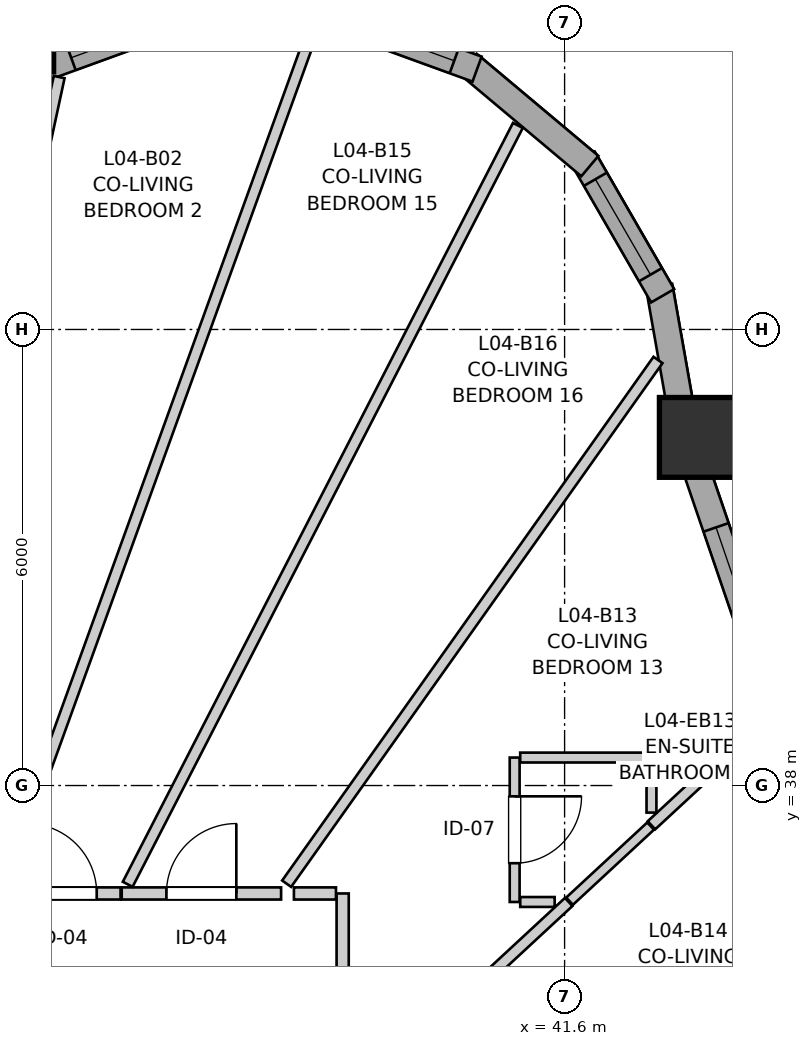
"""IFC4 building model, lengths in metres.
Left out: names, types, materials, properties, quantities, classifications, styles, units other than length and angle.
Written with IfcOpenShell. Run it as: python <this file> out.ifc"""

import sys

from ifc_helpers import new_model, si_unit, direction, frame, frame_2d, origin, origin_2d, place, context, subcontext, project, spatial, rectangle, i_section, extrude, source, transform, mapped, element, fill, save


model = new_model("IFC4")
c1 = context("Model", 3, precision=1e-05, world=origin(), true_north=direction((0.0, 1.0)))
c2 = subcontext(c1, "Body", "Model", "MODEL_VIEW")
j1 = project(units=[si_unit("LENGTHUNIT", "METRE"), si_unit("PLANEANGLEUNIT", "RADIAN")], contexts=[c1])
p1 = place(None, origin())
s1 = spatial("IfcSite", under=j1, at=p1, CompositionType="ELEMENT")
p2 = place(p1, origin())
s2 = spatial("IfcBuilding", under=s1, at=p2, CompositionType="ELEMENT")
p3 = place(p2, frame((0.0, 0.0, 17.4)))
s3 = spatial("IfcBuildingStorey", under=s2, at=p3, CompositionType="ELEMENT", Elevation=17.4)
m1 = source(origin(), c2, "Body", "SweptSolid", [
    extrude(rectangle(XDim=1.05, YDim=1.05, at=origin_2d()), origin(), (0.0, 0.0, 1.0), 2.94),
])
p4 = place(p3, frame((43.373, 42.58, 0.0), z_axis=(0.0, 0.0, 1.0), x_axis=(1.0, 0.0, 0.0)))
e1 = element("IfcColumn", 1, at=p4, inside=s3, PredefinedType="COLUMN", context=c2, shape_type="MappedRepresentation", body=[
    mapped(m1, transform((0.0, 0.0, 0.0), x_axis=(1.0, 0.0, 0.0), y_axis=(0.0, 1.0, 0.0), z_axis=(0.0, 0.0, 1.0), scale=1.0)),
])
m2 = source(origin(), c2, "Body", "SweptSolid", [
    extrude(i_section(OverallWidth=0.409, OverallDepth=0.425, WebThickness=0.03, FlangeThickness=0.048, FilletRadius=0.015, at=origin_2d()), origin(), (0.0, 0.0, 1.0), 2.94),
])
p5 = place(p3, frame((34.673, 47.603, 0.0), z_axis=(0.0, 0.0, 1.0), x_axis=(1.0, 0.0, 0.0)))
e2 = element("IfcColumn", 2, at=p5, inside=s3, PredefinedType="PILASTER", context=c2, shape_type="MappedRepresentation", body=[
    mapped(m2, transform((0.0, 0.0, 0.0), x_axis=(1.0, 0.0, 0.0), y_axis=(0.0, 1.0, 0.0), z_axis=(0.0, 0.0, 1.0), scale=1.0)),
])
p6 = place(p3, frame((44.353, 39.171, 0.0), z_axis=(0.0, 0.0, 1.0), x_axis=(-0.323604310653, 0.946192501623, 0.0)))
e3 = element("IfcWall", 3, at=p6, inside=s3, PredefinedType="SOLIDWALL", context=c2, shape_type="SweptSolid", body=[
    extrude(rectangle(XDim=3.243, YDim=0.35, at=frame_2d((1.621, 0.0))), origin(), (0.0, 0.0, 1.0), 2.42),
])
p7 = place(p6, frame((0.901, 0.0, 0.82)))
e4 = element("IfcOpeningElement", 4, at=p7, cuts=e3, PredefinedType="OPENING", context=c2, shape_type="SweptSolid", body=[
    extrude(rectangle(XDim=1.45, YDim=1.25, at=frame_2d((0.725, 0.625))), frame((0.0, 0.185, 0.0), z_axis=(0.0, -1.0, 0.0), x_axis=(1.0, 0.0, 0.0)), (0.0, 0.0, 1.0), 0.37),
])
p8 = place(p3, frame((43.148, 42.845, 0.0), z_axis=(0.0, 0.0, 1.0), x_axis=(-0.173745591742, 0.984790571315, 0.0)))
e5 = element("IfcWall", 5, at=p8, inside=s3, PredefinedType="SOLIDWALL", context=c2, shape_type="SweptSolid", body=[
    extrude(rectangle(XDim=1.752, YDim=0.35, at=frame_2d((0.876, 0.0))), origin(), (0.0, 0.0, 1.0), 2.42),
])
p9 = place(p3, frame((42.89, 44.443, 0.0), z_axis=(0.0, 0.0, 1.0), x_axis=(-0.499995423472, 0.866028046028, 0.0)))
e6 = element("IfcWall", 6, at=p9, inside=s3, PredefinedType="SOLIDWALL", context=c2, shape_type="SweptSolid", body=[
    extrude(rectangle(XDim=2.09, YDim=0.35, at=frame_2d((1.045, 0.0))), origin(), (0.0, 0.0, 1.0), 2.42),
])
p10 = place(p9, frame((0.32, 0.0, 0.82)))
e7 = element("IfcOpeningElement", 7, at=p10, cuts=e6, PredefinedType="OPENING", context=c2, shape_type="SweptSolid", body=[
    extrude(rectangle(XDim=1.45, YDim=1.25, at=frame_2d((0.725, 0.625))), frame((0.0, 0.185, 0.0), z_axis=(0.0, -1.0, 0.0), x_axis=(1.0, 0.0, 0.0)), (0.0, 0.0, 1.0), 0.37),
])
p11 = place(p3, frame((41.932, 46.15, 0.0), z_axis=(0.0, 0.0, 1.0), x_axis=(-0.766024572719, 0.642811289563, 0.0)))
e8 = element("IfcWall", 8, at=p11, inside=s3, PredefinedType="SOLIDWALL", context=c2, shape_type="SweptSolid", body=[
    extrude(rectangle(XDim=2.09, YDim=0.35, at=frame_2d((1.045, 0.0))), origin(), (0.0, 0.0, 1.0), 2.42),
])
p12 = place(p3, frame((40.448, 47.426, 0.0), z_axis=(0.0, 0.0, 1.0), x_axis=(-0.939711556618, 0.341968113072, 0.0)))
e9 = element("IfcWall", 9, at=p12, inside=s3, PredefinedType="SOLIDWALL", context=c2, shape_type="SweptSolid", body=[
    extrude(rectangle(XDim=2.09, YDim=0.35, at=frame_2d((1.045, 0.0))), origin(), (0.0, 0.0, 1.0), 2.42),
])
p13 = place(p12, frame((0.32, 0.0, 0.82)))
e10 = element("IfcOpeningElement", 10, at=p13, cuts=e9, PredefinedType="OPENING", context=c2, shape_type="SweptSolid", body=[
    extrude(rectangle(XDim=1.45, YDim=1.25, at=frame_2d((0.725, 0.625))), frame((0.0, 0.185, 0.0), z_axis=(0.0, -1.0, 0.0), x_axis=(1.0, 0.0, 0.0)), (0.0, 0.0, 1.0), 0.37),
])
p14 = place(p3, frame((36.661, 48.14, 0.0), z_axis=(0.0, 0.0, 1.0), x_axis=(-0.939691662178, -0.342022777067, 0.0)))
e11 = element("IfcWall", 11, at=p14, inside=s3, PredefinedType="SOLIDWALL", context=c2, shape_type="SweptSolid", body=[
    extrude(rectangle(XDim=2.032, YDim=0.35, at=frame_2d((1.016, 0.0))), origin(), (0.0, 0.0, 1.0), 2.42),
])
p15 = place(p14, frame((0.302, 0.0, 0.82)))
e12 = element("IfcOpeningElement", 12, at=p15, cuts=e11, PredefinedType="OPENING", context=c2, shape_type="SweptSolid", body=[
    extrude(rectangle(XDim=1.35, YDim=1.45, at=frame_2d((0.675, 0.725))), frame((0.0, 0.185, 0.0), z_axis=(0.0, -1.0, 0.0), x_axis=(1.0, 0.0, 0.0)), (0.0, 0.0, 1.0), 0.37),
])
p16 = place(p3, frame((38.68, 36.58, 0.0), z_axis=(0.0, 0.0, 1.0), x_axis=(0.0, -1.0, 0.0)))
e13 = element("IfcWall", 13, at=p16, inside=s3, PredefinedType="PARTITIONING", context=c2, shape_type="SweptSolid", body=[
    extrude(rectangle(XDim=2.83, YDim=0.16, at=frame_2d((1.415, 0.0))), origin(), (0.0, 0.0, 1.0), 2.94),
])
p17 = place(p16, frame((0.973, 0.0, 0.0)))
e14 = element("IfcOpeningElement", 14, at=p17, cuts=e13, PredefinedType="OPENING", context=c2, shape_type="SweptSolid", body=[
    extrude(rectangle(XDim=0.92, YDim=2.1, at=frame_2d((0.46, 1.05))), frame((0.0, 0.09, 0.0), z_axis=(0.0, -1.0, 0.0), x_axis=(1.0, 0.0, 0.0)), (0.0, 0.0, 1.0), 0.18),
])
p18 = place(p3, frame((35.773, 36.58, 0.0), z_axis=(0.0, 0.0, 1.0), x_axis=(1.0, 0.0, 0.0)))
e15 = element("IfcWall", 15, at=p18, inside=s3, PredefinedType="PARTITIONING", context=c2, shape_type="SweptSolid", body=[
    extrude(rectangle(XDim=2.097, YDim=0.16, at=frame_2d((1.049, 0.0))), origin(), (0.0, 0.0, 1.0), 2.94),
])
p19 = place(p18, frame((0.588, 0.0, 0.0)))
e16 = element("IfcOpeningElement", 16, at=p19, cuts=e15, PredefinedType="OPENING", context=c2, shape_type="SweptSolid", body=[
    extrude(rectangle(XDim=0.92, YDim=2.1, at=frame_2d((0.46, 1.05))), frame((0.0, 0.09, 0.0), z_axis=(0.0, -1.0, 0.0), x_axis=(1.0, 0.0, 0.0)), (0.0, 0.0, 1.0), 0.18),
])
p20 = place(p3, frame((40.943, 38.368, 0.0), z_axis=(0.0, 0.0, 1.0), x_axis=(0.0, -1.0, 0.0)))
e17 = element("IfcWall", 17, at=p20, inside=s3, PredefinedType="PARTITIONING", context=c2, shape_type="SweptSolid", body=[
    extrude(rectangle(XDim=1.9, YDim=0.13, at=frame_2d((0.95, 0.0))), origin(), (0.0, 0.0, 1.0), 2.94),
])
p21 = place(p20, frame((0.51, 0.0, 0.0)))
e18 = element("IfcOpeningElement", 18, at=p21, cuts=e17, PredefinedType="OPENING", context=c2, shape_type="SweptSolid", body=[
    extrude(rectangle(XDim=0.88, YDim=2.05, at=frame_2d((0.44, 1.025))), frame((0.0, 0.075, 0.0), z_axis=(0.0, -1.0, 0.0), x_axis=(1.0, 0.0, 0.0)), (0.0, 0.0, 1.0), 0.15),
])
p22 = place(p3, frame((34.162, 36.58, 0.0), z_axis=(0.0, 0.0, 1.0), x_axis=(1.0, 0.0, 0.0)))
e19 = element("IfcWall", 19, at=p22, inside=s3, PredefinedType="PARTITIONING", context=c2, shape_type="SweptSolid", body=[
    extrude(rectangle(XDim=1.596, YDim=0.16, at=frame_2d((0.798, 0.0))), origin(), (0.0, 0.0, 1.0), 2.94),
])
p23 = place(p22, frame((0.362, 0.0, 0.0)))
e20 = element("IfcOpeningElement", 20, at=p23, cuts=e19, PredefinedType="OPENING", context=c2, shape_type="SweptSolid", body=[
    extrude(rectangle(XDim=0.92, YDim=2.1, at=frame_2d((0.46, 1.05))), frame((0.0, 0.09, 0.0), z_axis=(0.0, -1.0, 0.0), x_axis=(1.0, 0.0, 0.0)), (0.0, 0.0, 1.0), 0.18),
])
p24 = place(p3, frame((34.219, 36.692, 0.0), z_axis=(0.0, 0.0, 1.0), x_axis=(0.340186046968, 0.940358151689, 0.0)))
e21 = element("IfcWall", 21, at=p24, inside=s3, PredefinedType="PARTITIONING", context=c2, shape_type="SweptSolid", body=[
    extrude(rectangle(XDim=11.951, YDim=0.145, at=frame_2d((5.976, 0.0))), origin(), (0.0, 0.0, 1.0), 2.94),
])
p25 = place(p3, frame((35.852, 36.7, 0.0), z_axis=(0.0, 0.0, 1.0), x_axis=(0.457258091214, 0.889334041865, 0.0)))
e22 = element("IfcWall", 22, at=p25, inside=s3, PredefinedType="PARTITIONING", context=c2, shape_type="SweptSolid", body=[
    extrude(rectangle(XDim=11.227, YDim=0.145, at=frame_2d((5.613, 0.0))), origin(), (0.0, 0.0, 1.0), 2.94),
])
p26 = place(p3, frame((32.655, 36.683, 0.0), z_axis=(0.0, 0.0, 1.0), x_axis=(0.210861831441, 0.977515876107, 0.0)))
e23 = element("IfcWall", 23, at=p26, inside=s3, PredefinedType="PARTITIONING", context=c2, shape_type="SweptSolid", body=[
    extrude(rectangle(XDim=10.882, YDim=0.145, at=frame_2d((5.441, 0.0))), origin(), (0.0, 0.0, 1.0), 2.94),
])
p27 = place(p3, frame((37.943, 36.708, 0.0), z_axis=(0.0, 0.0, 1.0), x_axis=(0.578429476704, 0.81573239514, 0.0)))
e24 = element("IfcWall", 24, at=p27, inside=s3, PredefinedType="PARTITIONING", context=c2, shape_type="SweptSolid", body=[
    extrude(rectangle(XDim=8.447, YDim=0.145, at=frame_2d((4.223, 0.0))), origin(), (0.0, 0.0, 1.0), 2.94),
])
p28 = place(p3, frame((38.815, 33.839, 0.0), z_axis=(0.0, 0.0, 1.0), x_axis=(0.733718730688, 0.67945332749, 0.0)))
e25 = element("IfcWall", 25, at=p28, inside=s3, PredefinedType="PARTITIONING", context=c2, shape_type="SweptSolid", body=[
    extrude(rectangle(XDim=3.869, YDim=0.145, at=frame_2d((1.935, 0.0))), origin(), (0.0, 0.0, 1.0), 2.94),
])
p29 = place(p3, frame((42.743, 37.477, 0.0), z_axis=(0.0, 0.0, 1.0), x_axis=(0.73374741774, 0.679422347999, 0.0)))
e26 = element("IfcWall", 26, at=p29, inside=s3, PredefinedType="PARTITIONING", context=c2, shape_type="SweptSolid", body=[
    extrude(rectangle(XDim=2.04, YDim=0.145, at=frame_2d((1.02, 0.0))), origin(), (0.0, 0.0, 1.0), 2.94),
])
p30 = place(p3, frame((41.016, 38.368, 0.0), z_axis=(0.0, 0.0, 1.0), x_axis=(1.0, 0.0, 0.0)))
e27 = element("IfcWall", 27, at=p30, inside=s3, PredefinedType="PARTITIONING", context=c2, shape_type="SweptSolid", body=[
    extrude(rectangle(XDim=1.727, YDim=0.13, at=frame_2d((0.863, 0.0))), origin(), (0.0, 0.0, 1.0), 2.94),
])
p31 = place(p3, frame((41.665, 36.478, 0.0), z_axis=(0.0, 0.0, 1.0), x_axis=(0.733534386117, 0.679652340821, 0.0)))
e28 = element("IfcWall", 28, at=p31, inside=s3, PredefinedType="PARTITIONING", context=c2, shape_type="SweptSolid", body=[
    extrude(rectangle(XDim=1.454, YDim=0.13, at=frame_2d((0.727, 0.0))), origin(), (0.0, 0.0, 1.0), 2.94),
])
p32 = place(p3, frame((42.743, 37.644, 0.0), z_axis=(0.0, 0.0, 1.0), x_axis=(0.0, 1.0, 0.0)))
e29 = element("IfcWall", 29, at=p32, inside=s3, PredefinedType="PARTITIONING", context=c2, shape_type="SweptSolid", body=[
    extrude(rectangle(XDim=0.651, YDim=0.13, at=frame_2d((0.325, 0.0))), origin(), (0.0, 0.0, 1.0), 2.94),
])
p33 = place(p3, frame((38.039, 36.58, 0.0), z_axis=(0.0, 0.0, 1.0), x_axis=(1.0, 0.0, 0.0)))
e30 = element("IfcWall", 30, at=p33, inside=s3, PredefinedType="PARTITIONING", context=c2, shape_type="SweptSolid", body=[
    extrude(rectangle(XDim=0.553, YDim=0.16, at=frame_2d((0.277, 0.0))), origin(), (0.0, 0.0, 1.0), 2.94),
])
p34 = place(p3, frame((41.016, 36.468, 0.0), z_axis=(0.0, 0.0, 1.0), x_axis=(1.0, 0.0, 0.0)))
e31 = element("IfcWall", 31, at=p34, inside=s3, PredefinedType="PARTITIONING", context=c2, shape_type="SweptSolid", body=[
    extrude(rectangle(XDim=0.453, YDim=0.13, at=frame_2d((0.227, 0.0))), origin(), (0.0, 0.0, 1.0), 2.94),
])
m3 = source(origin(), c2, "Body", "SweptSolid", [
    extrude(rectangle(XDim=1.45, YDim=1.25, at=frame_2d((0.725, 0.625))), frame((0.0, 0.03, 0.0), z_axis=(0.0, -1.0, 0.0), x_axis=(1.0, 0.0, 0.0)), (0.0, 0.0, 1.0), 0.06),
])
p35 = place(p7, origin())
e32 = element("IfcWindow", 32, at=p35, inside=s3, PartitioningType="SINGLE_PANEL", PredefinedType="WINDOW", context=c2, shape_type="MappedRepresentation", body=[
    mapped(m3, transform((0.0, 0.0, 0.0), x_axis=(1.0, 0.0, 0.0), y_axis=(0.0, 1.0, 0.0), z_axis=(0.0, 0.0, 1.0), scale=1.0)),
])
fill(e4, e32)
p36 = place(p10, origin())
e33 = element("IfcWindow", 33, at=p36, inside=s3, PartitioningType="SINGLE_PANEL", PredefinedType="WINDOW", context=c2, shape_type="MappedRepresentation", body=[
    mapped(m3, transform((0.0, 0.0, 0.0), x_axis=(1.0, 0.0, 0.0), y_axis=(0.0, 1.0, 0.0), z_axis=(0.0, 0.0, 1.0), scale=1.0)),
])
fill(e7, e33)
p37 = place(p13, origin())
e34 = element("IfcWindow", 34, at=p37, inside=s3, PartitioningType="SINGLE_PANEL", PredefinedType="WINDOW", context=c2, shape_type="MappedRepresentation", body=[
    mapped(m3, transform((0.0, 0.0, 0.0), x_axis=(1.0, 0.0, 0.0), y_axis=(0.0, 1.0, 0.0), z_axis=(0.0, 0.0, 1.0), scale=1.0)),
])
fill(e10, e34)
m4 = source(origin(), c2, "Body", "SweptSolid", [
    extrude(rectangle(XDim=1.35, YDim=1.45, at=frame_2d((0.675, 0.725))), frame((0.0, 0.03, 0.0), z_axis=(0.0, -1.0, 0.0), x_axis=(1.0, 0.0, 0.0)), (0.0, 0.0, 1.0), 0.06),
])
p38 = place(p15, origin())
e35 = element("IfcWindow", 35, at=p38, inside=s3, PartitioningType="SINGLE_PANEL", PredefinedType="WINDOW", context=c2, shape_type="MappedRepresentation", body=[
    mapped(m4, transform((0.0, 0.0, 0.0), x_axis=(1.0, 0.0, 0.0), y_axis=(0.0, 1.0, 0.0), z_axis=(0.0, 0.0, 1.0), scale=1.0)),
])
fill(e12, e35)
m5 = source(origin(), c2, "Body", "SweptSolid", [
    extrude(rectangle(XDim=0.92, YDim=2.1, at=frame_2d((0.46, 1.05))), frame((0.0, 0.025, 0.0), z_axis=(0.0, -1.0, 0.0), x_axis=(1.0, 0.0, 0.0)), (0.0, 0.0, 1.0), 0.05),
])
p39 = place(p19, origin())
e36 = element("IfcDoor", 36, at=p39, inside=s3, OperationType="SINGLE_SWING_RIGHT", PredefinedType="DOOR", context=c2, shape_type="MappedRepresentation", body=[
    mapped(m5, transform((0.0, 0.0, 0.0), x_axis=(1.0, 0.0, 0.0), y_axis=(0.0, 1.0, 0.0), z_axis=(0.0, 0.0, 1.0), scale=1.0)),
])
fill(e16, e36)
m6 = source(origin(), c2, "Body", "SweptSolid", [
    extrude(rectangle(XDim=0.88, YDim=2.05, at=frame_2d((0.44, 1.025))), frame((0.0, 0.025, 0.0), z_axis=(0.0, -1.0, 0.0), x_axis=(1.0, 0.0, 0.0)), (0.0, 0.0, 1.0), 0.05),
])
p40 = place(p21, origin())
e37 = element("IfcDoor", 37, at=p40, inside=s3, OperationType="SINGLE_SWING_LEFT", PredefinedType="DOOR", context=c2, shape_type="MappedRepresentation", body=[
    mapped(m6, transform((0.0, 0.0, 0.0), x_axis=(1.0, 0.0, 0.0), y_axis=(0.0, 1.0, 0.0), z_axis=(0.0, 0.0, 1.0), scale=1.0)),
])
fill(e18, e37)
p41 = place(p23, origin())
e38 = element("IfcDoor", 38, at=p41, inside=s3, OperationType="SINGLE_SWING_LEFT", PredefinedType="DOOR", context=c2, shape_type="MappedRepresentation", body=[
    mapped(m5, transform((0.0, 0.0, 0.0), x_axis=(1.0, 0.0, 0.0), y_axis=(0.0, 1.0, 0.0), z_axis=(0.0, 0.0, 1.0), scale=1.0)),
])
fill(e20, e38)
save(model, sys.argv[1])
